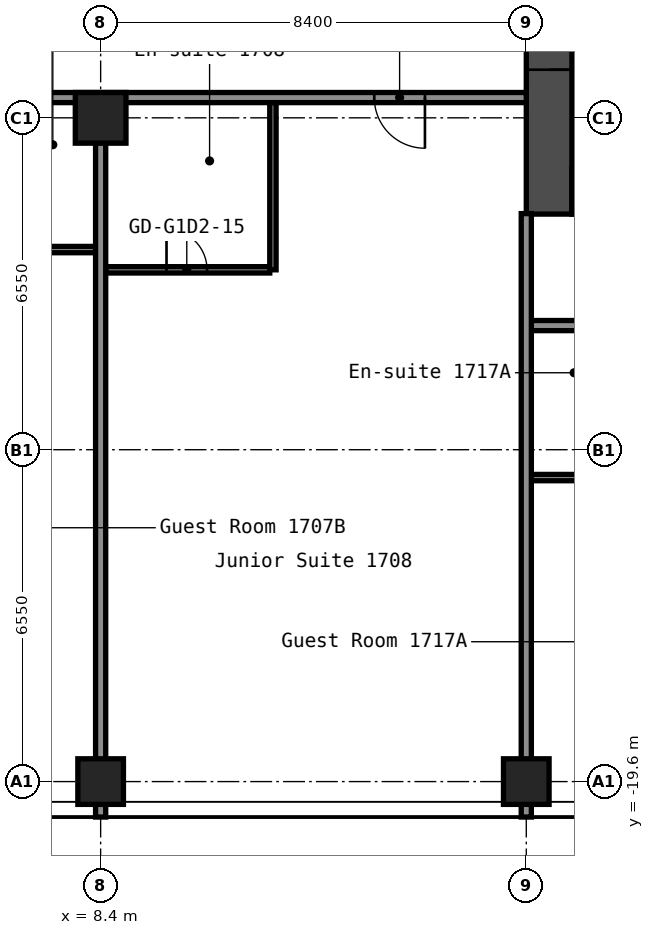
"""IFC4 building model, lengths in metres.
Left out: names, types, materials, properties, quantities, classifications, styles, units other than length and angle.
Written with IfcOpenShell. Run it as: python <this file> out.ifc"""

import sys

from ifc_helpers import new_model, si_unit, direction, frame, frame_2d, origin, origin_2d, place, context, subcontext, project, spatial, rectangle, hollow_rectangle, extrude, element, fill, save


model = new_model("IFC4")
c1 = context("Model", 3, precision=1e-05, world=origin(), true_north=direction((0.0, 1.0)))
c2 = subcontext(c1, "Body", "Model", "MODEL_VIEW")
j1 = project(units=[si_unit("LENGTHUNIT", "METRE"), si_unit("PLANEANGLEUNIT", "RADIAN")], contexts=[c1])
p1 = place(None, origin())
s1 = spatial("IfcSite", under=j1, at=p1, CompositionType="ELEMENT")
p2 = place(p1, origin())
s2 = spatial("IfcBuilding", under=s1, at=p2, CompositionType="ELEMENT")
p3 = place(p2, frame((0.0, 0.0, 61.4)))
s3 = spatial("IfcBuildingStorey", under=s2, at=p3, CompositionType="ELEMENT", Elevation=61.4)
p4 = place(p3, frame((8.4, -19.6, 0.0), z_axis=(0.0, 0.0, 1.0), x_axis=(1.0, 0.0, 0.0)))
e1 = element("IfcColumn", 1, at=p4, inside=s3, PredefinedType="COLUMN", context=c2, shape_type="SweptSolid", body=[
    extrude(hollow_rectangle(XDim=0.9, YDim=0.9, WallThickness=0.036, at=origin_2d()), origin(), (0.0, 0.0, 1.0), 2.9),
])
p5 = place(p3, frame((8.4, -6.5, 0.0), z_axis=(0.0, 0.0, 1.0), x_axis=(1.0, 0.0, 0.0)))
e2 = element("IfcColumn", 2, at=p5, inside=s3, PredefinedType="COLUMN", context=c2, shape_type="SweptSolid", body=[
    extrude(hollow_rectangle(XDim=1.0, YDim=1.0, WallThickness=0.04, at=origin_2d()), origin(), (0.0, 0.0, 1.0), 2.9),
])
p6 = place(p3, frame((16.8, -19.6, 0.0), z_axis=(0.0, 0.0, 1.0), x_axis=(1.0, 0.0, 0.0)))
e3 = element("IfcColumn", 3, at=p6, inside=s3, PredefinedType="COLUMN", context=c2, shape_type="SweptSolid", body=[
    extrude(hollow_rectangle(XDim=0.9, YDim=0.9, WallThickness=0.036, at=origin_2d()), origin(), (0.0, 0.0, 1.0), 2.9),
])
p7 = place(p3, frame((17.25, -8.4, 0.0), z_axis=(0.0, 0.0, 1.0), x_axis=(0.0, 1.0, 0.0)))
e4 = element("IfcWall", 4, at=p7, inside=s3, PredefinedType="SHEAR", context=c2, shape_type="SweptSolid", body=[
    extrude(rectangle(XDim=16.8, YDim=0.9, at=frame_2d((8.4, 0.0))), origin(), (0.0, 0.0, 1.0), 2.9),
])
p8 = place(p7, frame((12.75, 0.0, 0.0)))
e5 = element("IfcOpeningElement", 5, at=p8, cuts=e4, PredefinedType="OPENING", context=c2, shape_type="SweptSolid", body=[
    extrude(rectangle(XDim=1.2, YDim=2.1, at=frame_2d((0.6, 1.05))), frame((0.0, 0.46, 0.0), z_axis=(0.0, -1.0, 0.0), x_axis=(1.0, 0.0, 0.0)), (0.0, 0.0, 1.0), 0.92),
])
p9 = place(p7, frame((2.85, 0.0, 0.0)))
e6 = element("IfcOpeningElement", 6, at=p9, cuts=e4, PredefinedType="OPENING", context=c2, shape_type="SweptSolid", body=[
    extrude(rectangle(XDim=1.2, YDim=2.1, at=frame_2d((0.6, 1.05))), frame((0.0, 0.46, 0.0), z_axis=(0.0, -1.0, 0.0), x_axis=(1.0, 0.0, 0.0)), (0.0, 0.0, 1.0), 0.92),
])
p10 = place(p3, frame((17.7, -7.95, 0.0), z_axis=(0.0, 0.0, 1.0), x_axis=(1.0, 0.0, 0.0)))
e7 = element("IfcWall", 7, at=p10, inside=s3, PredefinedType="SHEAR", context=c2, shape_type="SweptSolid", body=[
    extrude(rectangle(XDim=15.0, YDim=0.9, at=frame_2d((7.5, 0.0))), origin(), (0.0, 0.0, 1.0), 2.9),
])
p11 = place(p10, frame((2.55, 0.0, 0.0)))
e8 = element("IfcOpeningElement", 8, at=p11, cuts=e7, PredefinedType="OPENING", context=c2, shape_type="SweptSolid", body=[
    extrude(rectangle(XDim=1.0, YDim=2.1, at=frame_2d((0.5, 1.05))), frame((0.0, 0.46, 0.0), z_axis=(0.0, -1.0, 0.0), x_axis=(1.0, 0.0, 0.0)), (0.0, 0.0, 1.0), 0.92),
])
p12 = place(p3, frame((16.9, -13.6, 0.0), z_axis=(0.0, 0.0, 1.0), x_axis=(1.0, 0.0, 0.0)))
e9 = element("IfcWall", 9, at=p12, inside=s3, PredefinedType="PARTITIONING", context=c2, shape_type="SweptSolid", body=[
    extrude(rectangle(XDim=2.338, YDim=0.125, at=frame_2d((1.169, 0.0))), origin(), (0.0, 0.0, 1.0), 2.9),
])
p13 = place(p3, frame((16.8, -10.6, 0.0), z_axis=(0.0, 0.0, 1.0), x_axis=(1.0, 0.0, 0.0)))
e10 = element("IfcWall", 10, at=p13, inside=s3, PredefinedType="PARTITIONING", context=c2, shape_type="SweptSolid", body=[
    extrude(rectangle(XDim=34.3, YDim=0.2, at=frame_2d((17.15, 0.0))), origin(), (0.0, 0.0, 1.0), 2.9),
])
p14 = place(p13, frame((2.85, 0.0, 0.0)))
e11 = element("IfcOpeningElement", 11, at=p14, cuts=e10, PredefinedType="OPENING", context=c2, shape_type="SweptSolid", body=[
    extrude(rectangle(XDim=1.0, YDim=2.1, at=frame_2d((0.5, 1.05))), frame((0.0, 0.11, 0.0), z_axis=(0.0, -1.0, 0.0), x_axis=(1.0, 0.0, 0.0)), (0.0, 0.0, 1.0), 0.22),
])
p15 = place(p13, frame((4.55, 0.0, 0.0)))
e12 = element("IfcOpeningElement", 12, at=p15, cuts=e10, PredefinedType="OPENING", context=c2, shape_type="SweptSolid", body=[
    extrude(rectangle(XDim=1.0, YDim=2.1, at=frame_2d((0.5, 1.05))), frame((0.0, 0.11, 0.0), z_axis=(0.0, -1.0, 0.0), x_axis=(1.0, 0.0, 0.0)), (0.0, 0.0, 1.0), 0.22),
])
p16 = place(p13, frame((13.9, 0.0, 0.0)))
e13 = element("IfcOpeningElement", 13, at=p16, cuts=e10, PredefinedType="OPENING", context=c2, shape_type="SweptSolid", body=[
    extrude(rectangle(XDim=1.0, YDim=2.1, at=frame_2d((0.5, 1.05))), frame((0.0, 0.11, 0.0), z_axis=(0.0, -1.0, 0.0), x_axis=(1.0, 0.0, 0.0)), (0.0, 0.0, 1.0), 0.22),
])
p17 = place(p13, frame((19.65, 0.0, 0.0)))
e14 = element("IfcOpeningElement", 14, at=p17, cuts=e10, PredefinedType="OPENING", context=c2, shape_type="SweptSolid", body=[
    extrude(rectangle(XDim=1.0, YDim=2.1, at=frame_2d((0.5, 1.05))), frame((0.0, 0.11, 0.0), z_axis=(0.0, -1.0, 0.0), x_axis=(1.0, 0.0, 0.0)), (0.0, 0.0, 1.0), 0.22),
])
p18 = place(p13, frame((21.35, 0.0, 0.0)))
e15 = element("IfcOpeningElement", 15, at=p18, cuts=e10, PredefinedType="OPENING", context=c2, shape_type="SweptSolid", body=[
    extrude(rectangle(XDim=1.0, YDim=2.1, at=frame_2d((0.5, 1.05))), frame((0.0, 0.11, 0.0), z_axis=(0.0, -1.0, 0.0), x_axis=(1.0, 0.0, 0.0)), (0.0, 0.0, 1.0), 0.22),
])
p19 = place(p13, frame((27.3, 0.0, 0.0)))
e16 = element("IfcOpeningElement", 16, at=p19, cuts=e10, PredefinedType="OPENING", context=c2, shape_type="SweptSolid", body=[
    extrude(rectangle(XDim=1.0, YDim=2.1, at=frame_2d((0.5, 1.05))), frame((0.0, 0.11, 0.0), z_axis=(0.0, -1.0, 0.0), x_axis=(1.0, 0.0, 0.0)), (0.0, 0.0, 1.0), 0.22),
])
p20 = place(p3, frame((8.5, -9.5, 0.0), z_axis=(0.0, 0.0, 1.0), x_axis=(1.0, 0.0, 0.0)))
e17 = element("IfcWall", 17, at=p20, inside=s3, PredefinedType="PARTITIONING", context=c2, shape_type="SweptSolid", body=[
    extrude(rectangle(XDim=3.238, YDim=0.125, at=frame_2d((1.619, 0.0))), origin(), (0.0, 0.0, 1.0), 2.9),
])
p21 = place(p20, frame((1.2, 0.0, 0.0)))
e18 = element("IfcOpeningElement", 18, at=p21, cuts=e17, PredefinedType="OPENING", context=c2, shape_type="SweptSolid", body=[
    extrude(rectangle(XDim=0.8, YDim=2.1, at=frame_2d((0.4, 1.05))), frame((0.0, 0.073, 0.0), z_axis=(0.0, -1.0, 0.0), x_axis=(1.0, 0.0, 0.0)), (0.0, 0.0, 1.0), 0.145),
])
p22 = place(p3, frame((5.962, -9.1, 0.0), z_axis=(0.0, 0.0, 1.0), x_axis=(1.0, 0.0, 0.0)))
e19 = element("IfcWall", 19, at=p22, inside=s3, PredefinedType="PARTITIONING", context=c2, shape_type="SweptSolid", body=[
    extrude(rectangle(XDim=2.338, YDim=0.125, at=frame_2d((1.169, 0.0))), origin(), (0.0, 0.0, 1.0), 2.9),
])
p23 = place(p3, frame((-16.8, -6.1, 0.0), z_axis=(0.0, 0.0, 1.0), x_axis=(1.0, 0.0, 0.0)))
e20 = element("IfcWall", 20, at=p23, inside=s3, PredefinedType="PARTITIONING", context=c2, shape_type="SweptSolid", body=[
    extrude(rectangle(XDim=33.6, YDim=0.2, at=frame_2d((16.8, 0.0))), origin(), (0.0, 0.0, 1.0), 2.9),
])
p24 = place(p23, frame((2.85, 0.0, 0.0)))
e21 = element("IfcOpeningElement", 21, at=p24, cuts=e20, PredefinedType="OPENING", context=c2, shape_type="SweptSolid", body=[
    extrude(rectangle(XDim=1.0, YDim=2.1, at=frame_2d((0.5, 1.05))), frame((0.0, 0.11, 0.0), z_axis=(0.0, -1.0, 0.0), x_axis=(1.0, 0.0, 0.0)), (0.0, 0.0, 1.0), 0.22),
])
p25 = place(p23, frame((4.55, 0.0, 0.0)))
e22 = element("IfcOpeningElement", 22, at=p25, cuts=e20, PredefinedType="OPENING", context=c2, shape_type="SweptSolid", body=[
    extrude(rectangle(XDim=1.0, YDim=2.1, at=frame_2d((0.5, 1.05))), frame((0.0, 0.11, 0.0), z_axis=(0.0, -1.0, 0.0), x_axis=(1.0, 0.0, 0.0)), (0.0, 0.0, 1.0), 0.22),
])
p26 = place(p23, frame((12.1, 0.0, 0.0)))
e23 = element("IfcOpeningElement", 23, at=p26, cuts=e20, PredefinedType="OPENING", context=c2, shape_type="SweptSolid", body=[
    extrude(rectangle(XDim=1.0, YDim=2.1, at=frame_2d((0.5, 1.05))), frame((0.0, 0.11, 0.0), z_axis=(0.0, -1.0, 0.0), x_axis=(1.0, 0.0, 0.0)), (0.0, 0.0, 1.0), 0.22),
])
p27 = place(p23, frame((19.65, 0.0, 0.0)))
e24 = element("IfcOpeningElement", 24, at=p27, cuts=e20, PredefinedType="OPENING", context=c2, shape_type="SweptSolid", body=[
    extrude(rectangle(XDim=1.0, YDim=2.1, at=frame_2d((0.5, 1.05))), frame((0.0, 0.11, 0.0), z_axis=(0.0, -1.0, 0.0), x_axis=(1.0, 0.0, 0.0)), (0.0, 0.0, 1.0), 0.22),
])
p28 = place(p23, frame((21.35, 0.0, 0.0)))
e25 = element("IfcOpeningElement", 25, at=p28, cuts=e20, PredefinedType="OPENING", context=c2, shape_type="SweptSolid", body=[
    extrude(rectangle(XDim=1.0, YDim=2.1, at=frame_2d((0.5, 1.05))), frame((0.0, 0.11, 0.0), z_axis=(0.0, -1.0, 0.0), x_axis=(1.0, 0.0, 0.0)), (0.0, 0.0, 1.0), 0.22),
])
p29 = place(p23, frame((30.6, 0.0, 0.0)))
e26 = element("IfcOpeningElement", 26, at=p29, cuts=e20, PredefinedType="OPENING", context=c2, shape_type="SweptSolid", body=[
    extrude(rectangle(XDim=1.0, YDim=2.1, at=frame_2d((0.5, 1.05))), frame((0.0, 0.11, 0.0), z_axis=(0.0, -1.0, 0.0), x_axis=(1.0, 0.0, 0.0)), (0.0, 0.0, 1.0), 0.22),
])
p30 = place(p3, frame((8.4, -20.3, 0.0), z_axis=(0.0, 0.0, 1.0), x_axis=(0.0, 1.0, 0.0)))
e27 = element("IfcWall", 27, at=p30, inside=s3, PredefinedType="PARTITIONING", context=c2, shape_type="SweptSolid", body=[
    extrude(rectangle(XDim=13.31, YDim=0.2, at=frame_2d((6.655, 0.0))), origin(), (0.0, 0.0, 1.0), 2.9),
])
p31 = place(p3, frame((11.8, -9.5, 0.0), z_axis=(0.0, 0.0, 1.0), x_axis=(0.0, 1.0, 0.0)))
e28 = element("IfcWall", 28, at=p31, inside=s3, PredefinedType="PARTITIONING", context=c2, shape_type="SweptSolid", body=[
    extrude(rectangle(XDim=3.3, YDim=0.125, at=frame_2d((1.65, 0.0))), origin(), (0.0, 0.0, 1.0), 2.9),
])
p32 = place(p3, frame((16.8, -20.3, 0.0), z_axis=(0.0, 0.0, 1.0), x_axis=(0.0, 1.0, 0.0)))
e29 = element("IfcWall", 29, at=p32, inside=s3, PredefinedType="PARTITIONING", context=c2, shape_type="SweptSolid", body=[
    extrude(rectangle(XDim=11.91, YDim=0.2, at=frame_2d((5.955, 0.0))), origin(), (0.0, 0.0, 1.0), 2.9),
])
p33 = place(p9, origin())
e30 = element("IfcDoor", 30, at=p33, inside=s3, OperationType="DOUBLE_DOOR_SINGLE_SWING", PredefinedType="DOOR", context=c2, shape_type="SweptSolid", body=[
    extrude(rectangle(XDim=1.2, YDim=2.1, at=frame_2d((0.6, 1.05))), frame((0.0, 0.025, 0.0), z_axis=(0.0, -1.0, 0.0), x_axis=(1.0, 0.0, 0.0)), (0.0, 0.0, 1.0), 0.05),
])
fill(e6, e30)
p34 = place(p21, origin())
e31 = element("IfcDoor", 31, at=p34, inside=s3, OperationType="SINGLE_SWING_RIGHT", PredefinedType="DOOR", context=c2, shape_type="SweptSolid", body=[
    extrude(rectangle(XDim=0.8, YDim=2.1, at=frame_2d((0.4, 1.05))), frame((0.0, 0.025, 0.0), z_axis=(0.0, -1.0, 0.0), x_axis=(1.0, 0.0, 0.0)), (0.0, 0.0, 1.0), 0.05),
])
fill(e18, e31)
p35 = place(p29, origin())
e32 = element("IfcDoor", 32, at=p35, inside=s3, OperationType="SINGLE_SWING_RIGHT", PredefinedType="DOOR", context=c2, shape_type="SweptSolid", body=[
    extrude(rectangle(XDim=1.0, YDim=2.1, at=frame_2d((0.5, 1.05))), frame((0.0, 0.025, 0.0), z_axis=(0.0, -1.0, 0.0), x_axis=(1.0, 0.0, 0.0)), (0.0, 0.0, 1.0), 0.05),
])
fill(e26, e32)
save(model, sys.argv[1])
